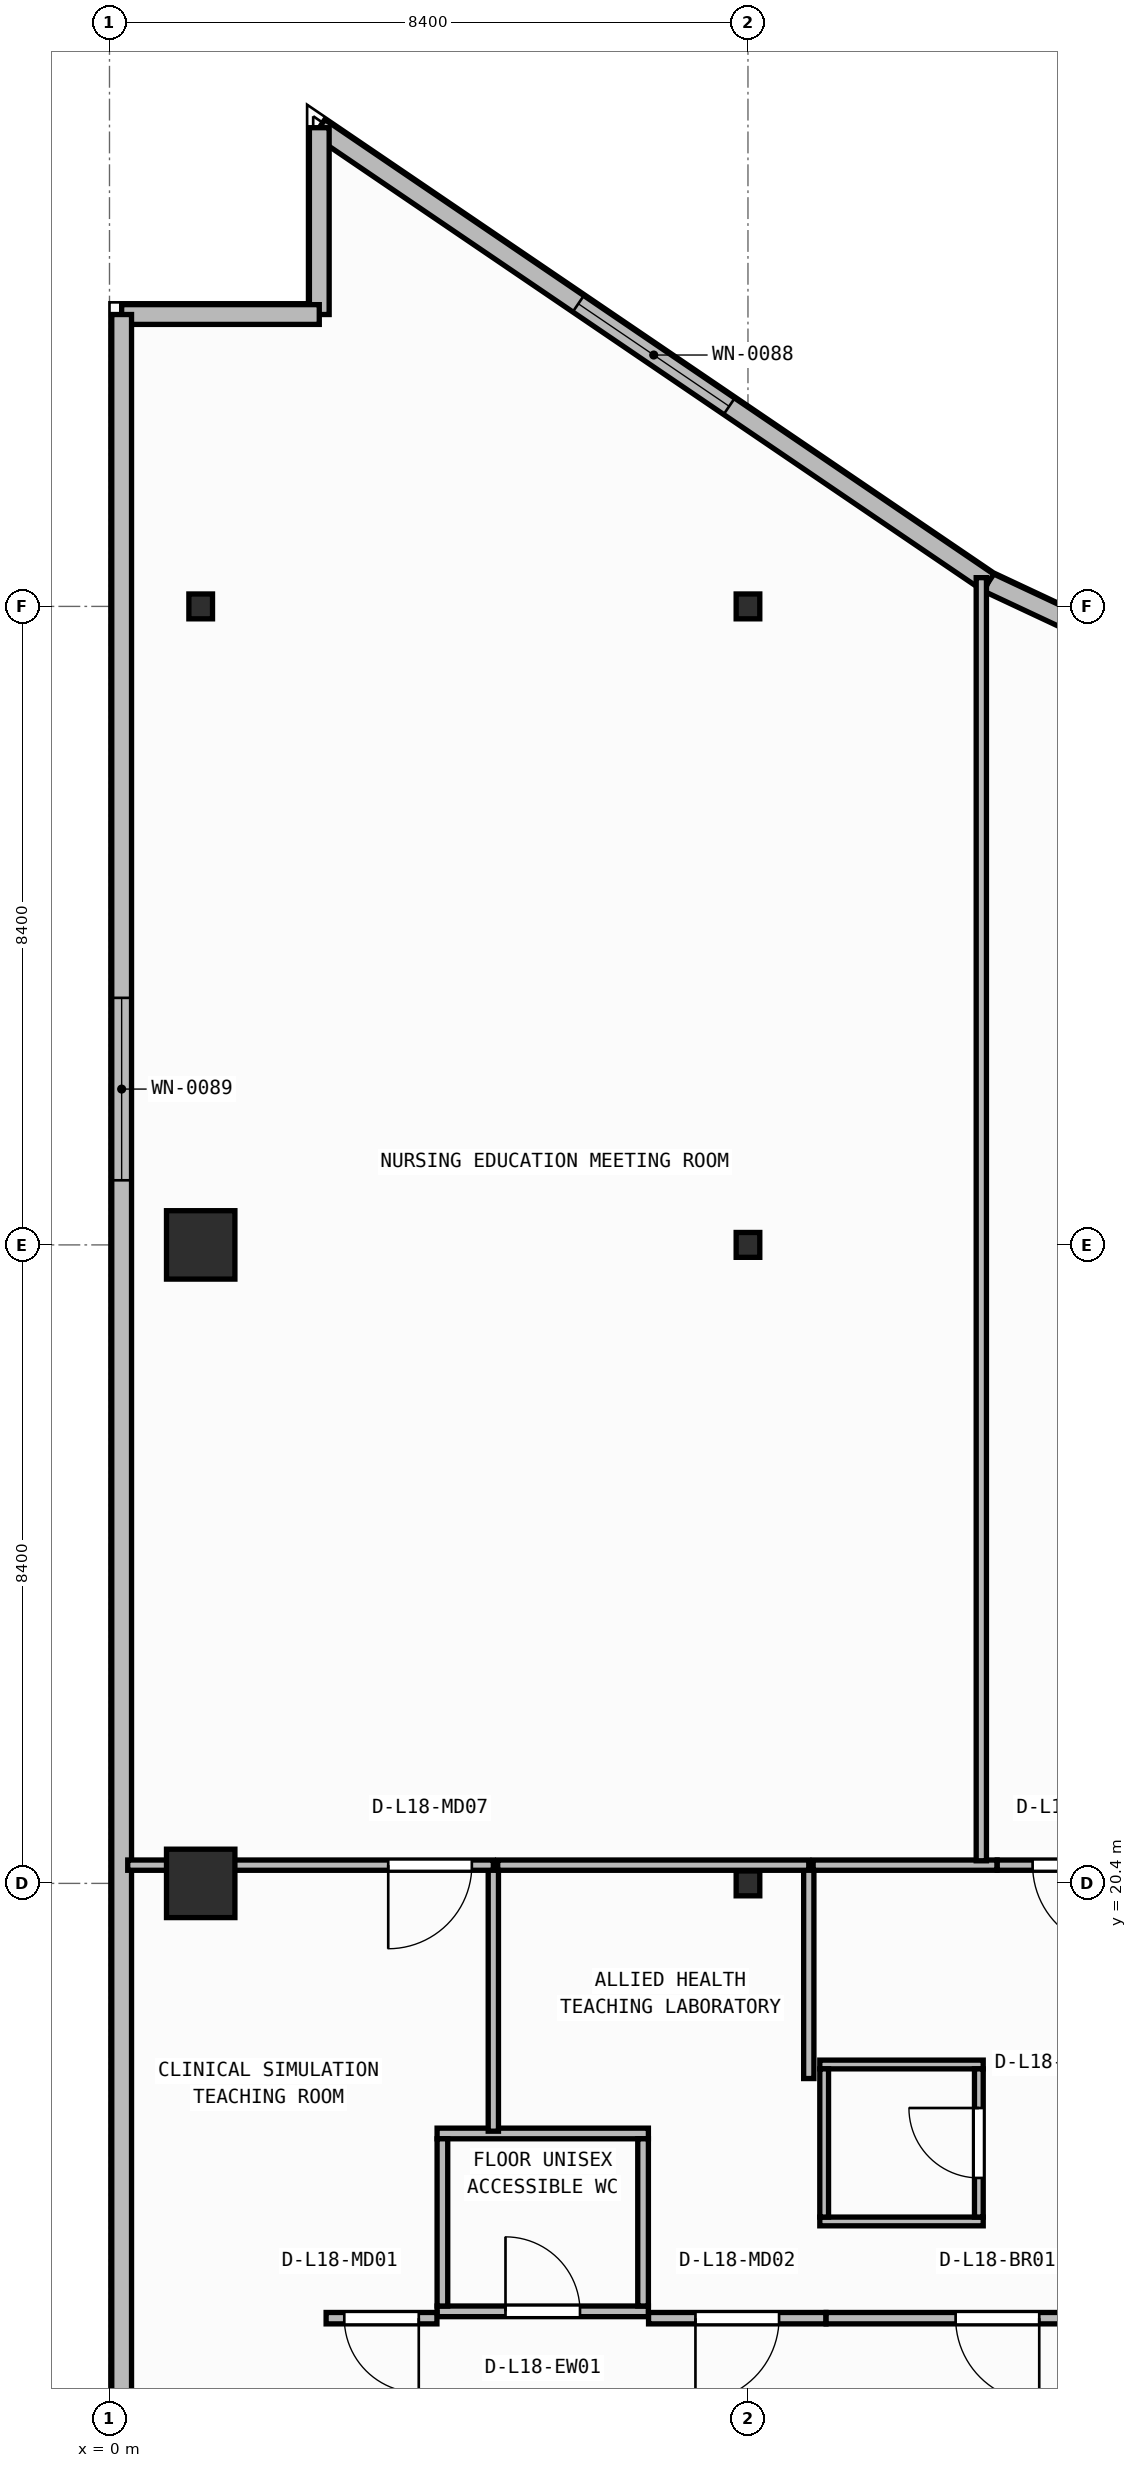
"""IFC4 building model, lengths in metres.
Left out: names, types, materials, properties, quantities, classifications, styles, units other than length and angle.
Written with IfcOpenShell. Run it as: python <this file> out.ifc"""

import sys

from ifc_helpers import new_model, si_unit, direction, frame, frame_2d, origin, origin_2d, place, context, subcontext, project, spatial, rectangle, i_section, extrude, element, fill, save


model = new_model("IFC4")
c1 = context("Model", 3, precision=1e-05, world=origin(), true_north=direction((0.0, 1.0)))
c2 = subcontext(c1, "Body", "Model", "MODEL_VIEW")
j1 = project(units=[si_unit("LENGTHUNIT", "METRE"), si_unit("PLANEANGLEUNIT", "RADIAN")], contexts=[c1])
p1 = place(None, origin())
s1 = spatial("IfcSite", under=j1, at=p1, CompositionType="ELEMENT")
p2 = place(p1, origin())
s2 = spatial("IfcBuilding", under=s1, at=p2, CompositionType="ELEMENT")
p3 = place(p2, frame((0.0, 0.0, 73.85)))
s3 = spatial("IfcBuildingStorey", under=s2, at=p3, CompositionType="ELEMENT", Elevation=73.85)
p4 = place(p3, frame((1.2, 20.4, 0.0), z_axis=(0.0, 0.0, 1.0), x_axis=(1.0, 0.0, 0.0)))
e1 = element("IfcColumn", 1, at=p4, inside=s3, PredefinedType="COLUMN", context=c2, shape_type="SweptSolid", body=[
    extrude(rectangle(XDim=0.9, YDim=0.9, at=origin_2d()), origin(), (0.0, 0.0, 1.0), 3.95),
])
p5 = place(p3, frame((8.4, 20.4, 0.0), z_axis=(0.0, 0.0, 1.0), x_axis=(1.0, 0.0, 0.0)))
e2 = element("IfcColumn", 2, at=p5, inside=s3, PredefinedType="COLUMN", context=c2, shape_type="SweptSolid", body=[
    extrude(i_section(OverallWidth=0.311, OverallDepth=0.327, WebThickness=0.016, FlangeThickness=0.025, FilletRadius=0.017, at=origin_2d()), origin(), (0.0, 0.0, 1.0), 3.95),
])
p6 = place(p3, frame((1.2, 28.8, 0.0), z_axis=(0.0, 0.0, 1.0), x_axis=(1.0, 0.0, 0.0)))
e3 = element("IfcColumn", 3, at=p6, inside=s3, PredefinedType="COLUMN", context=c2, shape_type="SweptSolid", body=[
    extrude(rectangle(XDim=0.9, YDim=0.9, at=origin_2d()), origin(), (0.0, 0.0, 1.0), 3.95),
])
for number, where, z_axis, x_axis in (
    (4, (8.4, 28.8, 0.0), (0.0, 0.0, 1.0), (1.0, 0.0, 0.0)),
    (5, (1.2, 37.2, 0.0), (0.0, 0.0, 1.0), (1.0, 0.0, 0.0)),
    (6, (8.4, 37.2, 0.0), (0.0, 0.0, 1.0), (1.0, 0.0, 0.0)),
):
    element("IfcColumn", number, at=place(p3, frame(where, z_axis=z_axis, x_axis=x_axis)), inside=s3, PredefinedType="COLUMN", context=c2, shape_type="SweptSolid", body=[
        extrude(i_section(OverallWidth=0.311, OverallDepth=0.327, WebThickness=0.016, FlangeThickness=0.025, FilletRadius=0.017, at=origin_2d()), origin(), (0.0, 0.0, 1.0), 3.95),
    ])
p7 = place(p3, frame((24.408, 31.492, 0.0), z_axis=(0.0, 0.0, 1.0), x_axis=(-0.905396522918, 0.424566998585, 0.0)))
e7 = element("IfcWall", 7, at=p7, inside=s3, PredefinedType="STANDARD", context=c2, shape_type="SweptSolid", body=[
    extrude(rectangle(XDim=14.189, YDim=0.26, at=frame_2d((7.095, 0.0))), origin(), (0.0, 0.0, 1.0), 3.71),
])
p8 = place(p7, frame((5.895, 0.0, 0.9)))
e8 = element("IfcOpeningElement", 8, at=p8, cuts=e7, PredefinedType="OPENING", context=c2, shape_type="SweptSolid", body=[
    extrude(rectangle(XDim=2.4, YDim=1.65, at=frame_2d((1.2, 0.825))), frame((0.0, 0.14, 0.0), z_axis=(0.0, -1.0, 0.0), x_axis=(1.0, 0.0, 0.0)), (0.0, 0.0, 1.0), 0.28),
])
p9 = place(p3, frame((11.561, 37.517, 0.0), z_axis=(0.0, 0.0, 1.0), x_axis=(-0.827064743936, 0.562106670782, 0.0)))
e9 = element("IfcWall", 9, at=p9, inside=s3, PredefinedType="STANDARD", context=c2, shape_type="SweptSolid", body=[
    extrude(rectangle(XDim=10.641, YDim=0.26, at=frame_2d((5.32, 0.0))), origin(), (0.0, 0.0, 1.0), 3.71),
])
p10 = place(p9, frame((4.12, 0.0, 0.9)))
e10 = element("IfcOpeningElement", 10, at=p10, cuts=e9, PredefinedType="OPENING", context=c2, shape_type="SweptSolid", body=[
    extrude(rectangle(XDim=2.4, YDim=1.65, at=frame_2d((1.2, 0.825))), frame((0.0, 0.14, 0.0), z_axis=(0.0, -1.0, 0.0), x_axis=(1.0, 0.0, 0.0)), (0.0, 0.0, 1.0), 0.28),
])
p11 = place(p3, frame((2.76, 43.498, 0.0), z_axis=(0.0, 0.0, 1.0), x_axis=(0.0, -1.0, 0.0)))
e11 = element("IfcWall", 11, at=p11, inside=s3, PredefinedType="STANDARD", context=c2, shape_type="SweptSolid", body=[
    extrude(rectangle(XDim=2.458, YDim=0.26, at=frame_2d((1.229, 0.0))), origin(), (0.0, 0.0, 1.0), 3.71),
])
p12 = place(p3, frame((2.76, 41.04, 0.0), z_axis=(0.0, 0.0, 1.0), x_axis=(-1.0, 0.0, 0.0)))
e12 = element("IfcWall", 12, at=p12, inside=s3, PredefinedType="STANDARD", context=c2, shape_type="SweptSolid", body=[
    extrude(rectangle(XDim=2.6, YDim=0.26, at=frame_2d((1.3, 0.0))), origin(), (0.0, 0.0, 1.0), 3.71),
])
p13 = place(p3, frame((0.16, 41.04, 0.0), z_axis=(0.0, 0.0, 1.0), x_axis=(0.0, -1.0, 0.0)))
e13 = element("IfcWall", 13, at=p13, inside=s3, PredefinedType="STANDARD", context=c2, shape_type="SweptSolid", body=[
    extrude(rectangle(XDim=38.28, YDim=0.26, at=frame_2d((19.14, 0.0))), origin(), (0.0, 0.0, 1.0), 3.71),
])
p14 = place(p13, frame((8.99, 0.0, 0.9)))
e14 = element("IfcOpeningElement", 14, at=p14, cuts=e13, PredefinedType="OPENING", context=c2, shape_type="SweptSolid", body=[
    extrude(rectangle(XDim=2.4, YDim=1.65, at=frame_2d((1.2, 0.825))), frame((0.0, 0.14, 0.0), z_axis=(0.0, -1.0, 0.0), x_axis=(1.0, 0.0, 0.0)), (0.0, 0.0, 1.0), 0.28),
])
p15 = place(p3, frame((4.31, 14.77, 0.0), z_axis=(0.0, 0.0, 1.0), x_axis=(1.0, 0.0, 0.0)))
e15 = element("IfcWall", 15, at=p15, inside=s3, PredefinedType="PARTITIONING", context=c2, shape_type="SweptSolid", body=[
    extrude(rectangle(XDim=2.78, YDim=0.14, at=frame_2d((1.39, 0.0))), origin(), (0.0, 0.0, 1.0), 3.71),
])
p16 = place(p15, frame((0.9, 0.0, 0.0)))
e16 = element("IfcOpeningElement", 16, at=p16, cuts=e15, PredefinedType="OPENING", context=c2, shape_type="SweptSolid", body=[
    extrude(rectangle(XDim=0.98, YDim=2.1, at=frame_2d((0.49, 1.05))), frame((0.0, 0.08, 0.0), z_axis=(0.0, -1.0, 0.0), x_axis=(1.0, 0.0, 0.0)), (0.0, 0.0, 1.0), 0.16),
])
p17 = place(p3, frame((4.31, 17.11, 0.0), z_axis=(0.0, 0.0, 1.0), x_axis=(1.0, 0.0, 0.0)))
e17 = element("IfcWall", 17, at=p17, inside=s3, PredefinedType="PARTITIONING", context=c2, shape_type="SweptSolid", body=[
    extrude(rectangle(XDim=2.78, YDim=0.14, at=frame_2d((1.39, 0.0))), origin(), (0.0, 0.0, 1.0), 3.71),
])
for number, where, z_axis, x_axis in (
    (18, (4.38, 14.84, 0.0), (0.0, 0.0, 1.0), (0.0, 1.0, 0.0)),
    (19, (7.02, 14.84, 0.0), (0.0, 0.0, 1.0), (0.0, 1.0, 0.0)),
):
    element("IfcWall", number, at=place(p3, frame(where, z_axis=z_axis, x_axis=x_axis)), inside=s3, PredefinedType="PARTITIONING", context=c2, shape_type="SweptSolid", body=[
        extrude(rectangle(XDim=2.2, YDim=0.14, at=frame_2d((1.1, 0.0))), origin(), (0.0, 0.0, 1.0), 3.71),
    ])
for number, where, z_axis, x_axis in (
    (20, (9.345, 15.952, 0.0), (0.0, 0.0, 1.0), (1.0, 0.0, 0.0)),
    (21, (9.345, 18.018, 0.0), (0.0, 0.0, 1.0), (1.0, 0.0, 0.0)),
):
    element("IfcWall", number, at=place(p3, frame(where, z_axis=z_axis, x_axis=x_axis)), inside=s3, PredefinedType="PARTITIONING", context=c2, shape_type="SweptSolid", body=[
        extrude(rectangle(XDim=2.15, YDim=0.115, at=frame_2d((1.075, 0.0))), origin(), (0.0, 0.0, 1.0), 3.71),
    ])
p18 = place(p3, frame((9.403, 16.01, 0.0), z_axis=(0.0, 0.0, 1.0), x_axis=(0.0, 1.0, 0.0)))
e22 = element("IfcWall", 22, at=p18, inside=s3, PredefinedType="PARTITIONING", context=c2, shape_type="SweptSolid", body=[
    extrude(rectangle(XDim=1.95, YDim=0.115, at=frame_2d((0.975, 0.0))), origin(), (0.0, 0.0, 1.0), 3.71),
])
p19 = place(p3, frame((11.438, 16.01, 0.0), z_axis=(0.0, 0.0, 1.0), x_axis=(0.0, 1.0, 0.0)))
e23 = element("IfcWall", 23, at=p19, inside=s3, PredefinedType="PARTITIONING", context=c2, shape_type="SweptSolid", body=[
    extrude(rectangle(XDim=1.95, YDim=0.115, at=frame_2d((0.975, 0.0))), origin(), (0.0, 0.0, 1.0), 3.71),
])
p20 = place(p19, frame((0.515, 0.0, 0.0)))
e24 = element("IfcOpeningElement", 24, at=p20, cuts=e23, PredefinedType="OPENING", context=c2, shape_type="SweptSolid", body=[
    extrude(rectangle(XDim=0.92, YDim=2.1, at=frame_2d((0.46, 1.05))), frame((0.0, 0.067, 0.0), z_axis=(0.0, -1.0, 0.0), x_axis=(1.0, 0.0, 0.0)), (0.0, 0.0, 1.0), 0.135),
])
p21 = place(p3, frame((4.308, 14.68, 0.0), z_axis=(0.0, 0.0, 1.0), x_axis=(-1.0, 0.0, 0.0)))
e25 = element("IfcWall", 25, at=p21, inside=s3, PredefinedType="PARTITIONING", context=c2, shape_type="SweptSolid", body=[
    extrude(rectangle(XDim=1.458, YDim=0.15, at=frame_2d((0.729, 0.0))), origin(), (0.0, 0.0, 1.0), 3.71),
])
p22 = place(p21, frame((0.239, 0.0, 0.0)))
e26 = element("IfcOpeningElement", 26, at=p22, cuts=e25, PredefinedType="OPENING", context=c2, shape_type="SweptSolid", body=[
    extrude(rectangle(XDim=0.98, YDim=2.1, at=frame_2d((0.49, 1.05))), frame((0.0, 0.085, 0.0), z_axis=(0.0, -1.0, 0.0), x_axis=(1.0, 0.0, 0.0)), (0.0, 0.0, 1.0), 0.17),
])
p23 = place(p3, frame((9.426, 14.68, 0.0), z_axis=(0.0, 0.0, 1.0), x_axis=(-1.0, 0.0, 0.0)))
e27 = element("IfcWall", 27, at=p23, inside=s3, PredefinedType="PARTITIONING", context=c2, shape_type="SweptSolid", body=[
    extrude(rectangle(XDim=2.334, YDim=0.15, at=frame_2d((1.167, 0.0))), origin(), (0.0, 0.0, 1.0), 3.71),
])
p24 = place(p23, frame((0.617, 0.0, 0.0)))
e28 = element("IfcOpeningElement", 28, at=p24, cuts=e27, PredefinedType="OPENING", context=c2, shape_type="SweptSolid", body=[
    extrude(rectangle(XDim=1.1, YDim=2.1, at=frame_2d((0.55, 1.05))), frame((0.0, 0.085, 0.0), z_axis=(0.0, -1.0, 0.0), x_axis=(1.0, 0.0, 0.0)), (0.0, 0.0, 1.0), 0.17),
])
p25 = place(p3, frame((13.936, 14.68, 0.0), z_axis=(0.0, 0.0, 1.0), x_axis=(-1.0, 0.0, 0.0)))
e29 = element("IfcWall", 29, at=p25, inside=s3, PredefinedType="PARTITIONING", context=c2, shape_type="SweptSolid", body=[
    extrude(rectangle(XDim=4.508, YDim=0.15, at=frame_2d((2.254, 0.0))), origin(), (0.0, 0.0, 1.0), 3.71),
])
p26 = place(p25, frame((1.704, 0.0, 0.0)))
e30 = element("IfcOpeningElement", 30, at=p26, cuts=e29, PredefinedType="OPENING", context=c2, shape_type="SweptSolid", body=[
    extrude(rectangle(XDim=1.1, YDim=2.1, at=frame_2d((0.55, 1.05))), frame((0.0, 0.085, 0.0), z_axis=(0.0, -1.0, 0.0), x_axis=(1.0, 0.0, 0.0)), (0.0, 0.0, 1.0), 0.17),
])
p27 = place(p3, frame((5.05, 17.14, 0.0), z_axis=(0.0, 0.0, 1.0), x_axis=(0.0, 1.0, 0.0)))
e31 = element("IfcWall", 31, at=p27, inside=s3, PredefinedType="PARTITIONING", context=c2, shape_type="SweptSolid", body=[
    extrude(rectangle(XDim=3.5, YDim=0.135, at=frame_2d((1.75, 0.0))), origin(), (0.0, 0.0, 1.0), 3.71),
])
p28 = place(p3, frame((5.05, 20.64, 0.0), z_axis=(0.0, 0.0, 1.0), x_axis=(-1.0, 0.0, 0.0)))
e32 = element("IfcWall", 32, at=p28, inside=s3, PredefinedType="PARTITIONING", context=c2, shape_type="SweptSolid", body=[
    extrude(rectangle(XDim=4.81, YDim=0.135, at=frame_2d((2.405, 0.0))), origin(), (0.0, 0.0, 1.0), 3.073),
])
p29 = place(p28, frame((0.283, 0.0, 0.0)))
e33 = element("IfcOpeningElement", 33, at=p29, cuts=e32, PredefinedType="OPENING", context=c2, shape_type="SweptSolid", body=[
    extrude(rectangle(XDim=1.1, YDim=2.1, at=frame_2d((0.55, 1.05))), frame((0.0, 0.077, 0.0), z_axis=(0.0, -1.0, 0.0), x_axis=(1.0, 0.0, 0.0)), (0.0, 0.0, 1.0), 0.155),
])
p30 = place(p3, frame((9.2, 17.833, 0.0), z_axis=(0.0, 0.0, 1.0), x_axis=(0.0, 1.0, 0.0)))
e34 = element("IfcWall", 34, at=p30, inside=s3, PredefinedType="PARTITIONING", context=c2, shape_type="SweptSolid", body=[
    extrude(rectangle(XDim=2.807, YDim=0.135, at=frame_2d((1.404, 0.0))), origin(), (0.0, 0.0, 1.0), 3.71),
])
p31 = place(p3, frame((9.2, 20.64, 0.0), z_axis=(0.0, 0.0, 1.0), x_axis=(-1.0, 0.0, 0.0)))
e35 = element("IfcWall", 35, at=p31, inside=s3, PredefinedType="PARTITIONING", context=c2, shape_type="SweptSolid", body=[
    extrude(rectangle(XDim=4.093, YDim=0.135, at=frame_2d((2.046, 0.0))), origin(), (0.0, 0.0, 1.0), 3.073),
])
p32 = place(p3, frame((11.677, 20.64, 0.0), z_axis=(0.0, 0.0, 1.0), x_axis=(-1.0, 0.0, 0.0)))
e36 = element("IfcWall", 36, at=p32, inside=s3, PredefinedType="PARTITIONING", context=c2, shape_type="SweptSolid", body=[
    extrude(rectangle(XDim=2.42, YDim=0.135, at=frame_2d((1.21, 0.0))), origin(), (0.0, 0.0, 1.0), 3.073),
])
p33 = place(p3, frame((13.71, 20.64, 0.0), z_axis=(0.0, 0.0, 1.0), x_axis=(-1.0, 0.0, 0.0)))
e37 = element("IfcWall", 37, at=p33, inside=s3, PredefinedType="PARTITIONING", context=c2, shape_type="SweptSolid", body=[
    extrude(rectangle(XDim=2.031, YDim=0.135, at=frame_2d((1.015, 0.0))), origin(), (0.0, 0.0, 1.0), 3.073),
])
p34 = place(p33, frame((0.465, 0.0, 0.0)))
e38 = element("IfcOpeningElement", 38, at=p34, cuts=e37, PredefinedType="OPENING", context=c2, shape_type="SweptSolid", body=[
    extrude(rectangle(XDim=1.1, YDim=2.1, at=frame_2d((0.55, 1.05))), frame((0.0, 0.077, 0.0), z_axis=(0.0, -1.0, 0.0), x_axis=(1.0, 0.0, 0.0)), (0.0, 0.0, 1.0), 0.155),
])
p35 = place(p3, frame((11.47, 20.698, 0.0), z_axis=(0.0, 0.0, 1.0), x_axis=(0.0, 1.0, 0.0)))
e39 = element("IfcWall", 39, at=p35, inside=s3, PredefinedType="PARTITIONING", context=c2, shape_type="SweptSolid", body=[
    extrude(rectangle(XDim=16.881, YDim=0.135, at=frame_2d((8.44, 0.0))), origin(), (0.0, 0.0, 1.0), 3.71),
])
p36 = place(p10, origin())
e40 = element("IfcWindow", 40, at=p36, inside=s3, PartitioningType="SINGLE_PANEL", PredefinedType="WINDOW", context=c2, shape_type="SweptSolid", body=[
    extrude(rectangle(XDim=2.4, YDim=1.65, at=frame_2d((1.2, 0.825))), frame((0.0, 0.03, 0.0), z_axis=(0.0, -1.0, 0.0), x_axis=(1.0, 0.0, 0.0)), (0.0, 0.0, 1.0), 0.06),
])
fill(e10, e40)
p37 = place(p14, origin())
e41 = element("IfcWindow", 41, at=p37, inside=s3, PartitioningType="SINGLE_PANEL", PredefinedType="WINDOW", context=c2, shape_type="SweptSolid", body=[
    extrude(rectangle(XDim=2.4, YDim=1.65, at=frame_2d((1.2, 0.825))), frame((0.0, 0.03, 0.0), z_axis=(0.0, -1.0, 0.0), x_axis=(1.0, 0.0, 0.0)), (0.0, 0.0, 1.0), 0.06),
])
fill(e14, e41)
p38 = place(p16, origin())
e42 = element("IfcDoor", 42, at=p38, inside=s3, OperationType="SINGLE_SWING_LEFT", PredefinedType="DOOR", context=c2, shape_type="SweptSolid", body=[
    extrude(rectangle(XDim=0.98, YDim=2.1, at=frame_2d((0.49, 1.05))), frame((0.0, 0.025, 0.0), z_axis=(0.0, -1.0, 0.0), x_axis=(1.0, 0.0, 0.0)), (0.0, 0.0, 1.0), 0.05),
])
fill(e16, e42)
p39 = place(p20, origin())
e43 = element("IfcDoor", 43, at=p39, inside=s3, OperationType="SINGLE_SWING_RIGHT", PredefinedType="DOOR", context=c2, shape_type="SweptSolid", body=[
    extrude(rectangle(XDim=0.92, YDim=2.1, at=frame_2d((0.46, 1.05))), frame((0.0, 0.025, 0.0), z_axis=(0.0, -1.0, 0.0), x_axis=(1.0, 0.0, 0.0)), (0.0, 0.0, 1.0), 0.05),
])
fill(e24, e43)
p40 = place(p22, origin())
e44 = element("IfcDoor", 44, at=p40, inside=s3, OperationType="SINGLE_SWING_LEFT", PredefinedType="DOOR", context=c2, shape_type="SweptSolid", body=[
    extrude(rectangle(XDim=0.98, YDim=2.1, at=frame_2d((0.49, 1.05))), frame((0.0, 0.025, 0.0), z_axis=(0.0, -1.0, 0.0), x_axis=(1.0, 0.0, 0.0)), (0.0, 0.0, 1.0), 0.05),
])
fill(e26, e44)
p41 = place(p24, origin())
e45 = element("IfcDoor", 45, at=p41, inside=s3, OperationType="SINGLE_SWING_RIGHT", PredefinedType="DOOR", context=c2, shape_type="SweptSolid", body=[
    extrude(rectangle(XDim=1.1, YDim=2.1, at=frame_2d((0.55, 1.05))), frame((0.0, 0.025, 0.0), z_axis=(0.0, -1.0, 0.0), x_axis=(1.0, 0.0, 0.0)), (0.0, 0.0, 1.0), 0.05),
])
fill(e28, e45)
p42 = place(p26, origin())
e46 = element("IfcDoor", 46, at=p42, inside=s3, OperationType="SINGLE_SWING_LEFT", PredefinedType="DOOR", context=c2, shape_type="SweptSolid", body=[
    extrude(rectangle(XDim=1.1, YDim=2.1, at=frame_2d((0.55, 1.05))), frame((0.0, 0.025, 0.0), z_axis=(0.0, -1.0, 0.0), x_axis=(1.0, 0.0, 0.0)), (0.0, 0.0, 1.0), 0.05),
])
fill(e30, e46)
p43 = place(p29, origin())
e47 = element("IfcDoor", 47, at=p43, inside=s3, OperationType="SINGLE_SWING_RIGHT", PredefinedType="DOOR", context=c2, shape_type="SweptSolid", body=[
    extrude(rectangle(XDim=1.1, YDim=2.1, at=frame_2d((0.55, 1.05))), frame((0.0, 0.025, 0.0), z_axis=(0.0, -1.0, 0.0), x_axis=(1.0, 0.0, 0.0)), (0.0, 0.0, 1.0), 0.05),
])
fill(e33, e47)
p44 = place(p34, origin())
e48 = element("IfcDoor", 48, at=p44, inside=s3, OperationType="SINGLE_SWING_LEFT", PredefinedType="DOOR", context=c2, shape_type="SweptSolid", body=[
    extrude(rectangle(XDim=1.1, YDim=2.1, at=frame_2d((0.55, 1.05))), frame((0.0, 0.025, 0.0), z_axis=(0.0, -1.0, 0.0), x_axis=(1.0, 0.0, 0.0)), (0.0, 0.0, 1.0), 0.05),
])
fill(e38, e48)
save(model, sys.argv[1])
